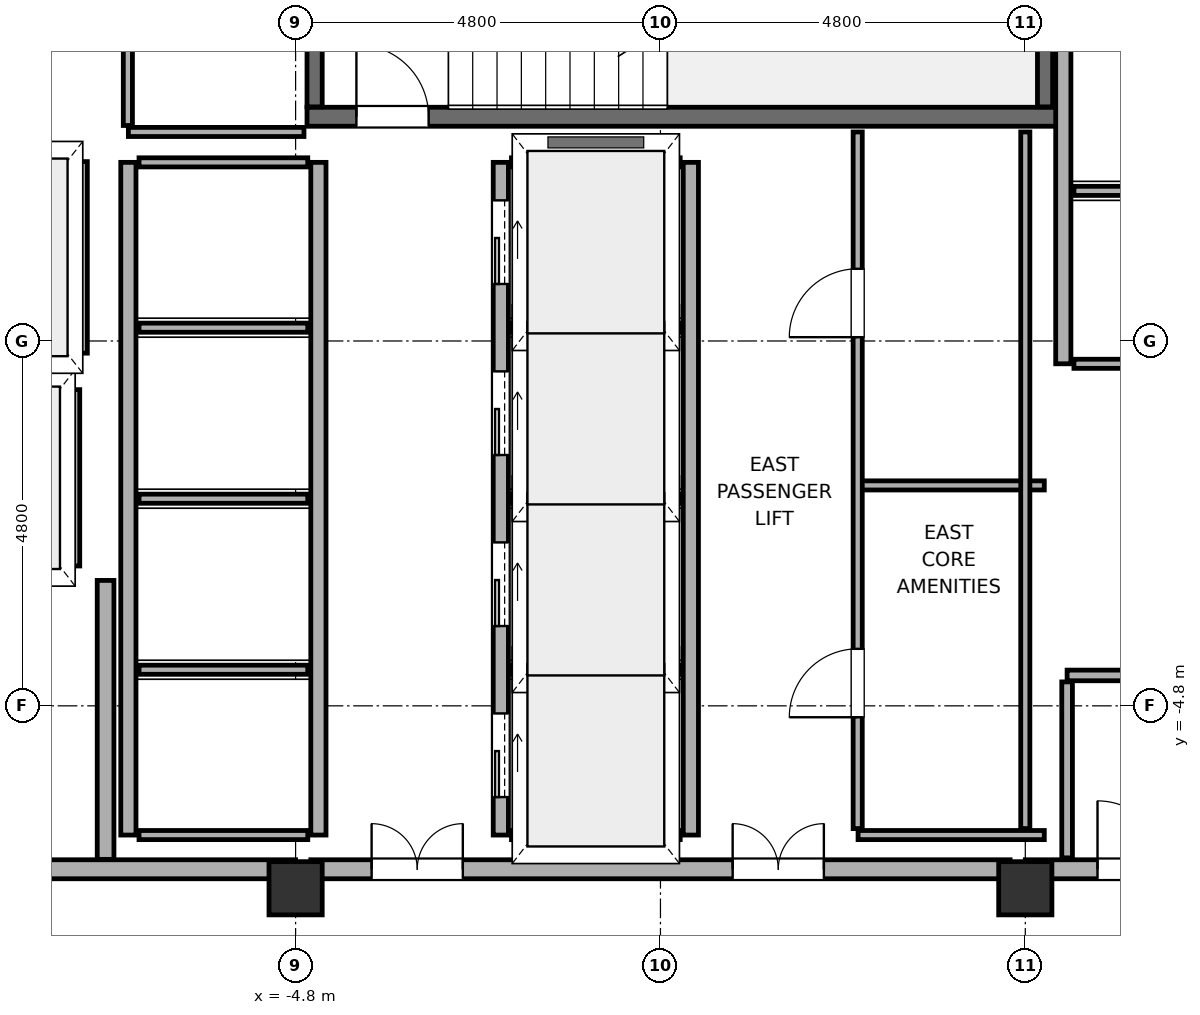
"""IFC4 building model, lengths in metres.
Left out: names, types, materials, properties, quantities, classifications, styles, units other than length and angle.
Written with IfcOpenShell. Run it as: python <this file> out.ifc"""

import sys

from ifc_helpers import new_model, si_unit, direction, frame, frame_2d, origin, origin_2d, place, context, subcontext, project, spatial, rectangle, hollow_rectangle, extrude, element, fill, save


model = new_model("IFC4")
c1 = context("Model", 3, precision=1e-05, world=origin(), true_north=direction((0.0, 1.0)))
c2 = subcontext(c1, "Body", "Model", "MODEL_VIEW")
j1 = project(units=[si_unit("LENGTHUNIT", "METRE"), si_unit("PLANEANGLEUNIT", "RADIAN")], contexts=[c1])
p1 = place(None, origin())
s1 = spatial("IfcSite", under=j1, at=p1, CompositionType="ELEMENT")
p2 = place(p1, origin())
s2 = spatial("IfcBuilding", under=s1, at=p2, CompositionType="ELEMENT")
p3 = place(p2, frame((0.0, 0.0, 124.8)))
s3 = spatial("IfcBuildingStorey", under=s2, at=p3, CompositionType="ELEMENT", Elevation=124.8)
for number, where, z_axis, x_axis in (
    (1, (-4.8, -7.2, 0.0), (0.0, 0.0, 1.0), (1.0, 0.0, 0.0)),
    (2, (4.8, -7.2, 0.0), (0.0, 0.0, 1.0), (1.0, 0.0, 0.0)),
):
    element("IfcColumn", number, at=place(p3, frame(where, z_axis=z_axis, x_axis=x_axis)), inside=s3, PredefinedType="COLUMN", context=c2, shape_type="SweptSolid", body=[
        extrude(hollow_rectangle(XDim=0.7, YDim=0.7, WallThickness=0.032, at=origin_2d()), origin(), (0.0, 0.0, 1.0), 3.7),
    ])
p4 = place(p3, frame((-14.2, -6.95, 0.0), z_axis=(0.0, 0.0, 1.0), x_axis=(1.0, 0.0, 0.0)))
e3 = element("IfcWall", 3, at=p4, inside=s3, PredefinedType="SOLIDWALL", context=c2, shape_type="SweptSolid", body=[
    extrude(rectangle(XDim=9.4, YDim=0.25, at=frame_2d((4.7, 0.0))), origin(), (0.0, 0.0, 1.0), 2.12),
])
p5 = place(p4, frame((4.9, 0.0, 0.0)))
e4 = element("IfcOpeningElement", 4, at=p5, cuts=e3, PredefinedType="OPENING", context=c2, shape_type="SweptSolid", body=[
    extrude(rectangle(XDim=1.0, YDim=2.02, at=frame_2d((0.5, 1.01))), frame((0.0, 0.14, 0.0), z_axis=(0.0, -1.0, 0.0), x_axis=(1.0, 0.0, 0.0)), (0.0, 0.0, 1.0), 0.28),
])
p6 = place(p3, frame((-4.6, -6.95, 0.0), z_axis=(0.0, 0.0, 1.0), x_axis=(1.0, 0.0, 0.0)))
e5 = element("IfcWall", 5, at=p6, inside=s3, PredefinedType="SOLIDWALL", context=c2, shape_type="SweptSolid", body=[
    extrude(rectangle(XDim=9.2, YDim=0.25, at=frame_2d((4.6, 0.0))), origin(), (0.0, 0.0, 1.0), 2.32),
])
p7 = place(p6, frame((0.8, 0.0, 0.0)))
e6 = element("IfcOpeningElement", 6, at=p7, cuts=e5, PredefinedType="OPENING", context=c2, shape_type="SweptSolid", body=[
    extrude(rectangle(XDim=1.2, YDim=2.2, at=frame_2d((0.6, 1.1))), frame((0.0, 0.14, 0.0), z_axis=(0.0, -1.0, 0.0), x_axis=(1.0, 0.0, 0.0)), (0.0, 0.0, 1.0), 0.28),
])
p8 = place(p6, frame((5.55, 0.0, 0.0)))
e7 = element("IfcOpeningElement", 7, at=p8, cuts=e5, PredefinedType="OPENING", context=c2, shape_type="SweptSolid", body=[
    extrude(rectangle(XDim=1.2, YDim=2.2, at=frame_2d((0.6, 1.1))), frame((0.0, 0.14, 0.0), z_axis=(0.0, -1.0, 0.0), x_axis=(1.0, 0.0, 0.0)), (0.0, 0.0, 1.0), 0.28),
])
p9 = place(p3, frame((4.8, -6.95, 0.0), z_axis=(0.0, 0.0, 1.0), x_axis=(1.0, 0.0, 0.0)))
e8 = element("IfcWall", 8, at=p9, inside=s3, PredefinedType="SOLIDWALL", context=c2, shape_type="SweptSolid", body=[
    extrude(rectangle(XDim=9.4, YDim=0.25, at=frame_2d((4.7, 0.0))), origin(), (0.0, 0.0, 1.0), 2.12),
])
p10 = place(p9, frame((3.5, 0.0, 0.0)))
e9 = element("IfcOpeningElement", 9, at=p10, cuts=e8, PredefinedType="OPENING", context=c2, shape_type="SweptSolid", body=[
    extrude(rectangle(XDim=1.0, YDim=2.02, at=frame_2d((0.5, 1.01))), frame((0.0, 0.14, 0.0), z_axis=(0.0, -1.0, 0.0), x_axis=(1.0, 0.0, 0.0)), (0.0, 0.0, 1.0), 0.28),
])
p11 = place(p9, frame((0.95, 0.0, 0.0)))
e10 = element("IfcOpeningElement", 10, at=p11, cuts=e8, PredefinedType="OPENING", context=c2, shape_type="SweptSolid", body=[
    extrude(rectangle(XDim=0.9, YDim=2.02, at=frame_2d((0.45, 1.01))), frame((0.0, 0.14, 0.0), z_axis=(0.0, -1.0, 0.0), x_axis=(1.0, 0.0, 0.0)), (0.0, 0.0, 1.0), 0.28),
])
p12 = place(p3, frame((-7.3, -6.82, 0.0), z_axis=(0.0, 0.0, 1.0), x_axis=(0.0, 1.0, 0.0)))
e11 = element("IfcWall", 11, at=p12, inside=s3, PredefinedType="SOLIDWALL", context=c2, shape_type="SweptSolid", body=[
    extrude(rectangle(XDim=3.67, YDim=0.22, at=frame_2d((1.835, 0.0))), origin(), (0.0, 0.0, 1.0), 2.12),
])
p13 = place(p3, frame((-4.65, 2.95, -0.18), z_axis=(0.0, 0.0, 1.0), x_axis=(1.0, 0.0, 0.0)))
e12 = element("IfcWall", 12, at=p13, inside=s3, PredefinedType="SOLIDWALL", context=c2, shape_type="SweptSolid", body=[
    extrude(rectangle(XDim=9.9, YDim=0.25, at=frame_2d((4.95, 0.0))), origin(), (0.0, 0.0, 1.0), 3.7),
])
p14 = place(p13, frame((0.65, 0.0, 0.18)))
e13 = element("IfcOpeningElement", 13, at=p14, cuts=e12, PredefinedType="OPENING", context=c2, shape_type="SweptSolid", body=[
    extrude(rectangle(XDim=0.95, YDim=2.15, at=frame_2d((0.475, 1.075))), frame((0.0, 0.14, 0.0), z_axis=(0.0, -1.0, 0.0), x_axis=(1.0, 0.0, 0.0)), (0.0, 0.0, 1.0), 0.28),
])
for number, where, z_axis, x_axis in (
    (14, (-4.55, 3.08, -0.18), (0.0, 0.0, 1.0), (0.0, 1.0, 0.0)),
    (15, (5.06, 3.08, -0.18), (0.0, 0.0, 1.0), (0.0, 1.0, 0.0)),
):
    element("IfcWall", number, at=place(p3, frame(where, z_axis=z_axis, x_axis=x_axis)), inside=s3, PredefinedType="SOLIDWALL", context=c2, shape_type="SweptSolid", body=[
        extrude(rectangle(XDim=3.74, YDim=0.2, at=frame_2d((1.87, 0.0))), origin(), (0.0, 0.0, 1.0), 3.7),
    ])
for number, where, z_axis, x_axis in (
    (16, (-4.5, -6.5, 0.0), (0.0, 0.0, 1.0), (0.0, 1.0, 0.0)),
    (17, (-7.0, -6.5, 0.0), (0.0, 0.0, 1.0), (0.0, 1.0, 0.0)),
):
    element("IfcWall", number, at=place(p3, frame(where, z_axis=z_axis, x_axis=x_axis)), inside=s3, PredefinedType="SOLIDWALL", context=c2, shape_type="SweptSolid", body=[
        extrude(rectangle(XDim=8.85, YDim=0.2, at=frame_2d((4.425, 0.0))), origin(), (0.0, 0.0, 1.0), 3.52),
    ])
for number, where, z_axis, x_axis in (
    (18, (-6.86, -6.5, 0.0), (0.0, 0.0, 1.0), (1.0, 0.0, 0.0)),
    (19, (-6.86, -4.325, 0.0), (0.0, 0.0, 1.0), (1.0, 0.0, 0.0)),
    (20, (-6.86, -2.075, 0.0), (0.0, 0.0, 1.0), (1.0, 0.0, 0.0)),
    (21, (-6.86, 0.175, 0.0), (0.0, 0.0, 1.0), (1.0, 0.0, 0.0)),
    (22, (-6.86, 2.35, 0.0), (0.0, 0.0, 1.0), (1.0, 0.0, 0.0)),
):
    element("IfcWall", number, at=place(p3, frame(where, z_axis=z_axis, x_axis=x_axis)), inside=s3, PredefinedType="PARTITIONING", context=c2, shape_type="SweptSolid", body=[
        extrude(rectangle(XDim=2.22, YDim=0.12, at=frame_2d((1.11, 0.0))), origin(), (0.0, 0.0, 1.0), 3.52),
    ])
p15 = place(p3, frame((-2.1, -6.5, 0.0), z_axis=(0.0, 0.0, 1.0), x_axis=(0.0, 1.0, 0.0)))
e23 = element("IfcWall", 23, at=p15, inside=s3, PredefinedType="SOLIDWALL", context=c2, shape_type="SweptSolid", body=[
    extrude(rectangle(XDim=8.85, YDim=0.2, at=frame_2d((4.425, 0.0))), origin(), (0.0, 0.0, 1.0), 3.52),
])
p16 = place(p15, frame((0.5, 0.0, 0.0)))
e24 = element("IfcOpeningElement", 24, at=p16, cuts=e23, PredefinedType="OPENING", context=c2, shape_type="SweptSolid", body=[
    extrude(rectangle(XDim=1.1, YDim=2.2, at=frame_2d((0.55, 1.1))), frame((0.0, 0.115, 0.0), z_axis=(0.0, -1.0, 0.0), x_axis=(1.0, 0.0, 0.0)), (0.0, 0.0, 1.0), 0.23),
])
p17 = place(p15, frame((2.75, 0.0, 0.0)))
e25 = element("IfcOpeningElement", 25, at=p17, cuts=e23, PredefinedType="OPENING", context=c2, shape_type="SweptSolid", body=[
    extrude(rectangle(XDim=1.1, YDim=2.2, at=frame_2d((0.55, 1.1))), frame((0.0, 0.115, 0.0), z_axis=(0.0, -1.0, 0.0), x_axis=(1.0, 0.0, 0.0)), (0.0, 0.0, 1.0), 0.23),
])
p18 = place(p15, frame((5.0, 0.0, 0.0)))
e26 = element("IfcOpeningElement", 26, at=p18, cuts=e23, PredefinedType="OPENING", context=c2, shape_type="SweptSolid", body=[
    extrude(rectangle(XDim=1.1, YDim=2.2, at=frame_2d((0.55, 1.1))), frame((0.0, 0.115, 0.0), z_axis=(0.0, -1.0, 0.0), x_axis=(1.0, 0.0, 0.0)), (0.0, 0.0, 1.0), 0.23),
])
p19 = place(p15, frame((7.25, 0.0, 0.0)))
e27 = element("IfcOpeningElement", 27, at=p19, cuts=e23, PredefinedType="OPENING", context=c2, shape_type="SweptSolid", body=[
    extrude(rectangle(XDim=1.1, YDim=2.2, at=frame_2d((0.55, 1.1))), frame((0.0, 0.115, 0.0), z_axis=(0.0, -1.0, 0.0), x_axis=(1.0, 0.0, 0.0)), (0.0, 0.0, 1.0), 0.23),
])
p20 = place(p3, frame((0.4, -6.5, 0.0), z_axis=(0.0, 0.0, 1.0), x_axis=(0.0, 1.0, 0.0)))
e28 = element("IfcWall", 28, at=p20, inside=s3, PredefinedType="SOLIDWALL", context=c2, shape_type="SweptSolid", body=[
    extrude(rectangle(XDim=8.85, YDim=0.2, at=frame_2d((4.425, 0.0))), origin(), (0.0, 0.0, 1.0), 3.52),
])
for number, where, z_axis, x_axis in (
    (29, (-1.96, -6.5, 0.0), (0.0, 0.0, 1.0), (1.0, 0.0, 0.0)),
    (30, (-1.96, -4.325, 0.0), (0.0, 0.0, 1.0), (1.0, 0.0, 0.0)),
    (31, (-1.96, -2.075, 0.0), (0.0, 0.0, 1.0), (1.0, 0.0, 0.0)),
    (32, (-1.96, 0.175, 0.0), (0.0, 0.0, 1.0), (1.0, 0.0, 0.0)),
    (33, (-1.96, 2.35, 0.0), (0.0, 0.0, 1.0), (1.0, 0.0, 0.0)),
):
    element("IfcWall", number, at=place(p3, frame(where, z_axis=z_axis, x_axis=x_axis)), inside=s3, PredefinedType="PARTITIONING", context=c2, shape_type="SweptSolid", body=[
        extrude(rectangle(XDim=2.22, YDim=0.12, at=frame_2d((1.11, 0.0))), origin(), (0.0, 0.0, 1.0), 3.52),
    ])
p21 = place(p3, frame((5.3, -0.3, 0.0), z_axis=(0.0, 0.0, 1.0), x_axis=(0.0, 1.0, 0.0)))
e34 = element("IfcWall", 34, at=p21, inside=s3, PredefinedType="SOLIDWALL", context=c2, shape_type="SweptSolid", body=[
    extrude(rectangle(XDim=6.8, YDim=0.2, at=frame_2d((3.4, 0.0))), origin(), (0.0, 0.0, 1.0), 3.52),
])
for number, where, z_axis, x_axis in (
    (35, (5.44, -0.3, 0.0), (0.0, 0.0, 1.0), (1.0, 0.0, 0.0)),
    (36, (5.44, 1.975, 0.0), (0.0, 0.0, 1.0), (1.0, 0.0, 0.0)),
):
    element("IfcWall", number, at=place(p3, frame(where, z_axis=z_axis, x_axis=x_axis)), inside=s3, PredefinedType="PARTITIONING", context=c2, shape_type="SweptSolid", body=[
        extrude(rectangle(XDim=2.12, YDim=0.12, at=frame_2d((1.06, 0.0))), origin(), (0.0, 0.0, 1.0), 3.52),
    ])
p22 = place(p3, frame((-9.82, -3.1, 0.0), z_axis=(0.0, 0.0, 1.0), x_axis=(1.0, 0.0, 0.0)))
e37 = element("IfcWall", 37, at=p22, inside=s3, PredefinedType="SOLIDWALL", context=c2, shape_type="SweptSolid", body=[
    extrude(rectangle(XDim=2.04, YDim=0.2, at=frame_2d((1.02, 0.0))), origin(), (0.0, 0.0, 1.0), 3.52),
])
p23 = place(p22, frame((0.47, 0.0, 0.0)))
e38 = element("IfcOpeningElement", 38, at=p23, cuts=e37, PredefinedType="OPENING", context=c2, shape_type="SweptSolid", body=[
    extrude(rectangle(XDim=1.1, YDim=2.2, at=frame_2d((0.55, 1.1))), frame((0.0, 0.115, 0.0), z_axis=(0.0, -1.0, 0.0), x_axis=(1.0, 0.0, 0.0)), (0.0, 0.0, 1.0), 0.23),
])
p24 = place(p3, frame((-9.82, -0.5, 0.0), z_axis=(0.0, 0.0, 1.0), x_axis=(1.0, 0.0, 0.0)))
e39 = element("IfcWall", 39, at=p24, inside=s3, PredefinedType="SOLIDWALL", context=c2, shape_type="SweptSolid", body=[
    extrude(rectangle(XDim=2.04, YDim=0.2, at=frame_2d((1.02, 0.0))), origin(), (0.0, 0.0, 1.0), 3.52),
])
p25 = place(p3, frame((-7.7, -2.96, 0.0), z_axis=(0.0, 0.0, 1.0), x_axis=(0.0, 1.0, 0.0)))
e40 = element("IfcWall", 40, at=p25, inside=s3, PredefinedType="PARTITIONING", context=c2, shape_type="SweptSolid", body=[
    extrude(rectangle(XDim=2.32, YDim=0.12, at=frame_2d((1.16, 0.0))), origin(), (0.0, 0.0, 1.0), 3.52),
])
p26 = place(p3, frame((-9.92, 2.5, 0.0), z_axis=(0.0, 0.0, 1.0), x_axis=(1.0, 0.0, 0.0)))
e41 = element("IfcWall", 41, at=p26, inside=s3, PredefinedType="SOLIDWALL", context=c2, shape_type="SweptSolid", body=[
    extrude(rectangle(XDim=2.24, YDim=0.2, at=frame_2d((1.12, 0.0))), origin(), (0.0, 0.0, 1.0), 3.52),
])
p27 = place(p26, frame((0.495, 0.0, 0.0)))
e42 = element("IfcOpeningElement", 42, at=p27, cuts=e41, PredefinedType="OPENING", context=c2, shape_type="SweptSolid", body=[
    extrude(rectangle(XDim=1.25, YDim=2.25, at=frame_2d((0.625, 1.125))), frame((0.0, 0.115, 0.0), z_axis=(0.0, -1.0, 0.0), x_axis=(1.0, 0.0, 0.0)), (0.0, 0.0, 1.0), 0.23),
])
p28 = place(p3, frame((-9.92, -0.3, 0.0), z_axis=(0.0, 0.0, 1.0), x_axis=(1.0, 0.0, 0.0)))
e43 = element("IfcWall", 43, at=p28, inside=s3, PredefinedType="SOLIDWALL", context=c2, shape_type="SweptSolid", body=[
    extrude(rectangle(XDim=2.24, YDim=0.2, at=frame_2d((1.12, 0.0))), origin(), (0.0, 0.0, 1.0), 3.52),
])
p29 = place(p3, frame((-7.6, -0.16, 0.0), z_axis=(0.0, 0.0, 1.0), x_axis=(0.0, 1.0, 0.0)))
e44 = element("IfcWall", 44, at=p29, inside=s3, PredefinedType="PARTITIONING", context=c2, shape_type="SweptSolid", body=[
    extrude(rectangle(XDim=2.52, YDim=0.12, at=frame_2d((1.26, 0.0))), origin(), (0.0, 0.0, 1.0), 3.52),
])
p30 = place(p3, frame((2.6, -6.5, 0.0), z_axis=(0.0, 0.0, 1.0), x_axis=(1.0, 0.0, 0.0)))
e45 = element("IfcWall", 45, at=p30, inside=s3, PredefinedType="PARTITIONING", context=c2, shape_type="SweptSolid", body=[
    extrude(rectangle(XDim=2.45, YDim=0.12, at=frame_2d((1.225, 0.0))), origin(), (0.0, 0.0, 1.0), 3.52),
])
p31 = place(p3, frame((5.35, -4.4, 0.0), z_axis=(0.0, 0.0, 1.0), x_axis=(1.0, 0.0, 0.0)))
e46 = element("IfcWall", 46, at=p31, inside=s3, PredefinedType="PLUMBINGWALL", context=c2, shape_type="SweptSolid", body=[
    extrude(rectangle(XDim=1.65, YDim=0.14, at=frame_2d((0.825, 0.0))), origin(), (0.0, 0.0, 1.0), 3.52),
])
p32 = place(p3, frame((2.6, -1.9, 0.0), z_axis=(0.0, 0.0, 1.0), x_axis=(1.0, 0.0, 0.0)))
e47 = element("IfcWall", 47, at=p32, inside=s3, PredefinedType="PARTITIONING", context=c2, shape_type="SweptSolid", body=[
    extrude(rectangle(XDim=2.45, YDim=0.12, at=frame_2d((1.225, 0.0))), origin(), (0.0, 0.0, 1.0), 3.52),
])
p33 = place(p3, frame((-7.0, 2.75, 0.0), z_axis=(0.0, 0.0, 1.0), x_axis=(1.0, 0.0, 0.0)))
e48 = element("IfcWall", 48, at=p33, inside=s3, PredefinedType="PARTITIONING", context=c2, shape_type="SweptSolid", body=[
    extrude(rectangle(XDim=2.31, YDim=0.12, at=frame_2d((1.155, 0.0))), origin(), (0.0, 0.0, 1.0), 3.52),
])
p34 = place(p3, frame((-7.007, 2.835, 0.0), z_axis=(0.0, 0.0, 1.0), x_axis=(0.0, 1.0, 0.0)))
e49 = element("IfcWall", 49, at=p34, inside=s3, PredefinedType="PARTITIONING", context=c2, shape_type="SweptSolid", body=[
    extrude(rectangle(XDim=3.63, YDim=0.12, at=frame_2d((1.815, 0.0))), origin(), (0.0, 0.0, 1.0), 3.52),
])
p35 = place(p34, frame((1.315, 0.0, 0.0)))
e50 = element("IfcOpeningElement", 50, at=p35, cuts=e49, PredefinedType="OPENING", context=c2, shape_type="SweptSolid", body=[
    extrude(rectangle(XDim=0.9, YDim=2.1, at=frame_2d((0.45, 1.05))), frame((0.0, 0.075, 0.0), z_axis=(0.0, -1.0, 0.0), x_axis=(1.0, 0.0, 0.0)), (0.0, 0.0, 1.0), 0.15),
])
p36 = place(p3, frame((2.595, -6.415, 0.0), z_axis=(0.0, 0.0, 1.0), x_axis=(0.0, 1.0, 0.0)))
e51 = element("IfcWall", 51, at=p36, inside=s3, PredefinedType="PARTITIONING", context=c2, shape_type="SweptSolid", body=[
    extrude(rectangle(XDim=9.165, YDim=0.12, at=frame_2d((4.583, 0.0))), origin(), (0.0, 0.0, 1.0), 3.52),
])
p37 = place(p36, frame((1.465, 0.0, 0.0)))
e52 = element("IfcOpeningElement", 52, at=p37, cuts=e51, PredefinedType="OPENING", context=c2, shape_type="SweptSolid", body=[
    extrude(rectangle(XDim=0.9, YDim=2.1, at=frame_2d((0.45, 1.05))), frame((0.0, 0.075, 0.0), z_axis=(0.0, -1.0, 0.0), x_axis=(1.0, 0.0, 0.0)), (0.0, 0.0, 1.0), 0.15),
])
p38 = place(p36, frame((6.465, 0.0, 0.0)))
e53 = element("IfcOpeningElement", 53, at=p38, cuts=e51, PredefinedType="OPENING", context=c2, shape_type="SweptSolid", body=[
    extrude(rectangle(XDim=0.9, YDim=2.1, at=frame_2d((0.45, 1.05))), frame((0.0, 0.075, 0.0), z_axis=(0.0, -1.0, 0.0), x_axis=(1.0, 0.0, 0.0)), (0.0, 0.0, 1.0), 0.15),
])
p39 = place(p3, frame((4.8, -6.415, 0.0), z_axis=(0.0, 0.0, 1.0), x_axis=(0.0, 1.0, 0.0)))
e54 = element("IfcWall", 54, at=p39, inside=s3, PredefinedType="PARTITIONING", context=c2, shape_type="SweptSolid", body=[
    extrude(rectangle(XDim=9.165, YDim=0.12, at=frame_2d((4.583, 0.0))), origin(), (0.0, 0.0, 1.0), 3.52),
])
p40 = place(p3, frame((5.35, -6.8, 0.0), z_axis=(0.0, 0.0, 1.0), x_axis=(0.0, 1.0, 0.0)))
e55 = element("IfcWall", 55, at=p40, inside=s3, PredefinedType="PLUMBINGWALL", context=c2, shape_type="SweptSolid", body=[
    extrude(rectangle(XDim=2.315, YDim=0.14, at=frame_2d((1.157, 0.0))), origin(), (0.0, 0.0, 1.0), 2.12),
])
p41 = place(p7, origin())
e56 = element("IfcDoor", 56, at=p41, inside=s3, OperationType="DOUBLE_DOOR_SINGLE_SWING", PredefinedType="DOOR", context=c2, shape_type="SweptSolid", body=[
    extrude(rectangle(XDim=1.2, YDim=2.2, at=frame_2d((0.6, 1.1))), frame((0.0, 0.025, 0.0), z_axis=(0.0, -1.0, 0.0), x_axis=(1.0, 0.0, 0.0)), (0.0, 0.0, 1.0), 0.05),
])
fill(e6, e56)
p42 = place(p8, origin())
e57 = element("IfcDoor", 57, at=p42, inside=s3, OperationType="DOUBLE_DOOR_SINGLE_SWING", PredefinedType="DOOR", context=c2, shape_type="SweptSolid", body=[
    extrude(rectangle(XDim=1.2, YDim=2.2, at=frame_2d((0.6, 1.1))), frame((0.0, 0.025, 0.0), z_axis=(0.0, -1.0, 0.0), x_axis=(1.0, 0.0, 0.0)), (0.0, 0.0, 1.0), 0.05),
])
fill(e7, e57)
p43 = place(p14, origin())
e58 = element("IfcDoor", 58, at=p43, inside=s3, OperationType="SINGLE_SWING_LEFT", PredefinedType="DOOR", context=c2, shape_type="SweptSolid", body=[
    extrude(rectangle(XDim=0.95, YDim=2.15, at=frame_2d((0.475, 1.075))), frame((0.0, 0.025, 0.0), z_axis=(0.0, -1.0, 0.0), x_axis=(1.0, 0.0, 0.0)), (0.0, 0.0, 1.0), 0.05),
])
fill(e13, e58)
p44 = place(p16, origin())
e59 = element("IfcDoor", 59, at=p44, inside=s3, OperationType="SLIDING_TO_LEFT", PredefinedType="DOOR", context=c2, shape_type="SweptSolid", body=[
    extrude(rectangle(XDim=1.1, YDim=2.2, at=frame_2d((0.55, 1.1))), frame((0.0, 0.025, 0.0), z_axis=(0.0, -1.0, 0.0), x_axis=(1.0, 0.0, 0.0)), (0.0, 0.0, 1.0), 0.05),
])
fill(e24, e59)
p45 = place(p17, origin())
e60 = element("IfcDoor", 60, at=p45, inside=s3, OperationType="SLIDING_TO_LEFT", PredefinedType="DOOR", context=c2, shape_type="SweptSolid", body=[
    extrude(rectangle(XDim=1.1, YDim=2.2, at=frame_2d((0.55, 1.1))), frame((0.0, 0.025, 0.0), z_axis=(0.0, -1.0, 0.0), x_axis=(1.0, 0.0, 0.0)), (0.0, 0.0, 1.0), 0.05),
])
fill(e25, e60)
p46 = place(p18, origin())
e61 = element("IfcDoor", 61, at=p46, inside=s3, OperationType="SLIDING_TO_LEFT", PredefinedType="DOOR", context=c2, shape_type="SweptSolid", body=[
    extrude(rectangle(XDim=1.1, YDim=2.2, at=frame_2d((0.55, 1.1))), frame((0.0, 0.025, 0.0), z_axis=(0.0, -1.0, 0.0), x_axis=(1.0, 0.0, 0.0)), (0.0, 0.0, 1.0), 0.05),
])
fill(e26, e61)
p47 = place(p19, origin())
e62 = element("IfcDoor", 62, at=p47, inside=s3, OperationType="SLIDING_TO_LEFT", PredefinedType="DOOR", context=c2, shape_type="SweptSolid", body=[
    extrude(rectangle(XDim=1.1, YDim=2.2, at=frame_2d((0.55, 1.1))), frame((0.0, 0.025, 0.0), z_axis=(0.0, -1.0, 0.0), x_axis=(1.0, 0.0, 0.0)), (0.0, 0.0, 1.0), 0.05),
])
fill(e27, e62)
p48 = place(p37, origin())
e63 = element("IfcDoor", 63, at=p48, inside=s3, OperationType="SINGLE_SWING_RIGHT", PredefinedType="DOOR", context=c2, shape_type="SweptSolid", body=[
    extrude(rectangle(XDim=0.9, YDim=2.1, at=frame_2d((0.45, 1.05))), frame((0.0, 0.025, 0.0), z_axis=(0.0, -1.0, 0.0), x_axis=(1.0, 0.0, 0.0)), (0.0, 0.0, 1.0), 0.05),
])
fill(e52, e63)
p49 = place(p38, origin())
e64 = element("IfcDoor", 64, at=p49, inside=s3, OperationType="SINGLE_SWING_RIGHT", PredefinedType="DOOR", context=c2, shape_type="SweptSolid", body=[
    extrude(rectangle(XDim=0.9, YDim=2.1, at=frame_2d((0.45, 1.05))), frame((0.0, 0.025, 0.0), z_axis=(0.0, -1.0, 0.0), x_axis=(1.0, 0.0, 0.0)), (0.0, 0.0, 1.0), 0.05),
])
fill(e53, e64)
p50 = place(p11, origin())
e65 = element("IfcDoor", 65, at=p50, inside=s3, OperationType="SINGLE_SWING_RIGHT", PredefinedType="DOOR", context=c2, shape_type="SweptSolid", body=[
    extrude(rectangle(XDim=0.9, YDim=2.02, at=frame_2d((0.45, 1.01))), frame((0.0, 0.025, 0.0), z_axis=(0.0, -1.0, 0.0), x_axis=(1.0, 0.0, 0.0)), (0.0, 0.0, 1.0), 0.05),
])
fill(e10, e65)
save(model, sys.argv[1])
